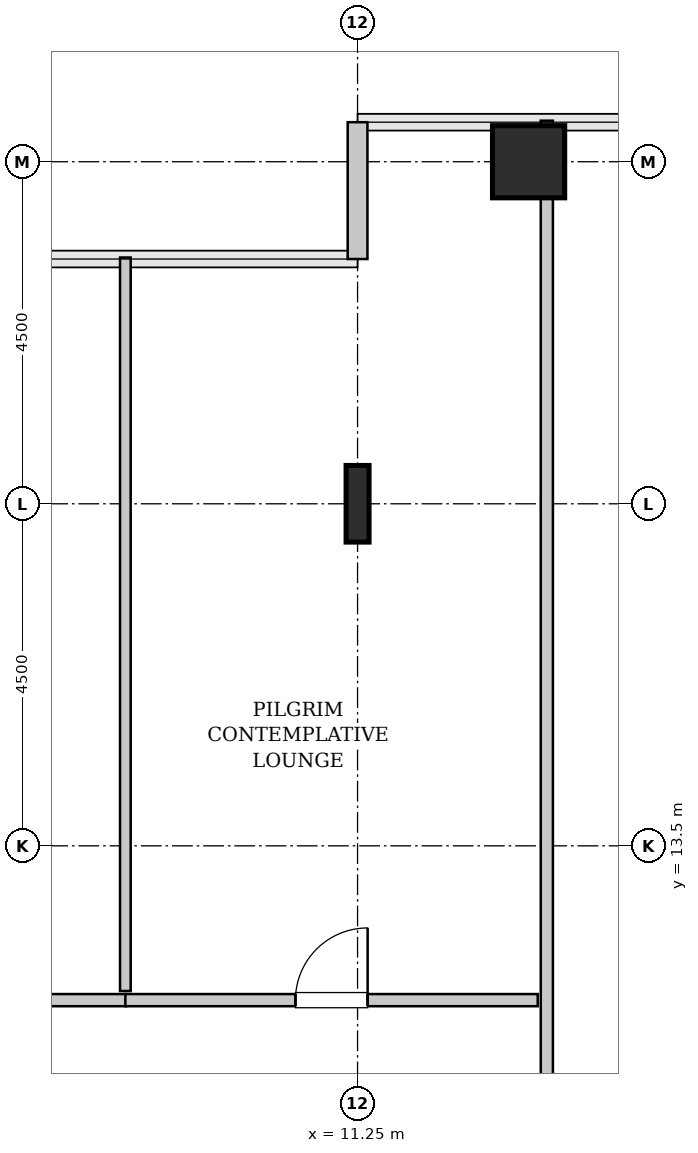
"""IFC4 building model, lengths in metres.
Left out: names, types, materials, properties, quantities, classifications, styles, units other than length and angle.
Written with IfcOpenShell. Run it as: python <this file> out.ifc"""

import sys

from ifc_helpers import new_model, si_unit, direction, frame, frame_2d, origin, origin_2d, place, context, subcontext, project, spatial, rectangle, hollow_rectangle, i_section, extrude, source, transform, mapped, element, fill, save


model = new_model("IFC4")
c1 = context("Model", 3, precision=1e-05, world=origin(), true_north=direction((0.0, 1.0)))
c2 = subcontext(c1, "Body", "Model", "MODEL_VIEW")
j1 = project(units=[si_unit("LENGTHUNIT", "METRE"), si_unit("PLANEANGLEUNIT", "RADIAN")], contexts=[c1])
p1 = place(None, origin())
s1 = spatial("IfcSite", under=j1, at=p1, CompositionType="ELEMENT")
p2 = place(p1, origin())
s2 = spatial("IfcBuilding", under=s1, at=p2, CompositionType="ELEMENT")
p3 = place(p2, frame((0.0, 0.0, 98.4)))
s3 = spatial("IfcBuildingStorey", under=s2, at=p3, CompositionType="ELEMENT", Elevation=98.4)
m1 = source(origin(), c2, "Body", "SweptSolid", [
    extrude(i_section(OverallWidth=0.302, OverallDepth=1.008, WebThickness=0.021, FlangeThickness=0.04, FilletRadius=0.03, at=origin_2d()), origin(), (0.0, 0.0, 1.0), 3.8),
])
p4 = place(p3, frame((11.25, 18.0, 0.0), z_axis=(0.0, 0.0, 1.0), x_axis=(1.0, 0.0, 0.0)))
e1 = element("IfcColumn", 1, at=p4, inside=s3, PredefinedType="COLUMN", context=c2, shape_type="MappedRepresentation", body=[
    mapped(m1, transform((0.0, 0.0, 0.0), x_axis=(1.0, 0.0, 0.0), y_axis=(0.0, 1.0, 0.0), z_axis=(0.0, 0.0, 1.0), scale=1.0)),
])
m2 = source(origin(), c2, "Body", "SweptSolid", [
    extrude(hollow_rectangle(XDim=0.95, YDim=0.95, WallThickness=0.045, InnerFilletRadius=0.045, OuterFilletRadius=0.09, at=origin_2d()), origin(), (0.0, 0.0, 1.0), 3.8),
])
p5 = place(p3, frame((13.5, 22.5, 0.0), z_axis=(0.0, 0.0, 1.0), x_axis=(1.0, 0.0, 0.0)))
e2 = element("IfcColumn", 2, at=p5, inside=s3, PredefinedType="COLUMN", context=c2, shape_type="MappedRepresentation", body=[
    mapped(m2, transform((0.0, 0.0, 0.0), x_axis=(1.0, 0.0, 0.0), y_axis=(0.0, 1.0, 0.0), z_axis=(0.0, 0.0, 1.0), scale=1.0)),
])
m3 = source(origin(), c2, "Body", "SweptSolid", [
    extrude(rectangle(XDim=1.8, YDim=0.26, at=frame_2d((0.9, 0.0))), origin(), (0.0, 0.0, 1.0), 3.55),
])
p6 = place(p3, frame((11.25, 23.02, 0.0), z_axis=(0.0, 0.0, 1.0), x_axis=(0.0, -1.0, 0.0)))
e3 = element("IfcWall", 3, at=p6, inside=s3, PredefinedType="SOLIDWALL", context=c2, shape_type="MappedRepresentation", body=[
    mapped(m3, transform((0.0, 0.0, 0.0), x_axis=(1.0, 0.0, 0.0), y_axis=(0.0, 1.0, 0.0), z_axis=(0.0, 0.0, 1.0), scale=1.0)),
])
m4 = source(origin(), c2, "Body", "SweptSolid", [
    extrude(rectangle(XDim=16.135, YDim=0.16, at=frame_2d((8.067, 0.0))), origin(), (0.0, 0.0, 1.0), 3.535),
])
p7 = place(p3, frame((13.74, 6.905, 0.0), z_axis=(0.0, 0.0, 1.0), x_axis=(0.0, 1.0, 0.0)))
e4 = element("IfcWall", 4, at=p7, inside=s3, PredefinedType="PARTITIONING", context=c2, shape_type="MappedRepresentation", body=[
    mapped(m4, transform((0.0, 0.0, 0.0), x_axis=(1.0, 0.0, 0.0), y_axis=(0.0, 1.0, 0.0), z_axis=(0.0, 0.0, 1.0), scale=1.0)),
])
p8 = place(p7, frame((1.827, 0.0, 0.0)))
e5 = element("IfcOpeningElement", 5, at=p8, cuts=e4, PredefinedType="OPENING", context=c2, shape_type="SweptSolid", body=[
    extrude(rectangle(XDim=0.95, YDim=2.1, at=frame_2d((0.475, 1.05))), frame((0.0, 0.09, 0.0), z_axis=(0.0, -1.0, 0.0), x_axis=(1.0, 0.0, 0.0)), (0.0, 0.0, 1.0), 0.18),
])
m5 = source(origin(), c2, "Body", "SweptSolid", [
    extrude(rectangle(XDim=5.61, YDim=0.16, at=frame_2d((2.805, 0.0))), origin(), (0.0, 0.0, 1.0), 3.535),
])
p9 = place(p3, frame((2.595, 11.47, 0.0), z_axis=(0.0, 0.0, 1.0), x_axis=(1.0, 0.0, 0.0)))
e6 = element("IfcWall", 6, at=p9, inside=s3, PredefinedType="PARTITIONING", context=c2, shape_type="MappedRepresentation", body=[
    mapped(m5, transform((0.0, 0.0, 0.0), x_axis=(1.0, 0.0, 0.0), y_axis=(0.0, 1.0, 0.0), z_axis=(0.0, 0.0, 1.0), scale=1.0)),
])
p10 = place(p9, frame((2.33, 0.0, 0.0)))
e7 = element("IfcOpeningElement", 7, at=p10, cuts=e6, PredefinedType="OPENING", context=c2, shape_type="SweptSolid", body=[
    extrude(rectangle(XDim=0.95, YDim=2.1, at=frame_2d((0.475, 1.05))), frame((0.0, 0.09, 0.0), z_axis=(0.0, -1.0, 0.0), x_axis=(1.0, 0.0, 0.0)), (0.0, 0.0, 1.0), 0.18),
])
m6 = source(origin(), c2, "Body", "SweptSolid", [
    extrude(rectangle(XDim=9.65, YDim=0.14, at=frame_2d((4.825, 0.0))), origin(), (0.0, 0.0, 1.0), 3.535),
])
p11 = place(p3, frame((8.195, 11.59, 0.0), z_axis=(0.0, 0.0, 1.0), x_axis=(0.0, 1.0, 0.0)))
e8 = element("IfcWall", 8, at=p11, inside=s3, PredefinedType="PARTITIONING", context=c2, shape_type="MappedRepresentation", body=[
    mapped(m6, transform((0.0, 0.0, 0.0), x_axis=(1.0, 0.0, 0.0), y_axis=(0.0, 1.0, 0.0), z_axis=(0.0, 0.0, 1.0), scale=1.0)),
])
m7 = source(origin(), c2, "Body", "SweptSolid", [
    extrude(rectangle(XDim=5.425, YDim=0.16, at=frame_2d((2.712, 0.0))), origin(), (0.0, 0.0, 1.0), 3.535),
])
p12 = place(p3, frame((8.195, 11.47, 0.0), z_axis=(0.0, 0.0, 1.0), x_axis=(1.0, 0.0, 0.0)))
e9 = element("IfcWall", 9, at=p12, inside=s3, PredefinedType="PARTITIONING", context=c2, shape_type="MappedRepresentation", body=[
    mapped(m7, transform((0.0, 0.0, 0.0), x_axis=(1.0, 0.0, 0.0), y_axis=(0.0, 1.0, 0.0), z_axis=(0.0, 0.0, 1.0), scale=1.0)),
])
p13 = place(p12, frame((2.238, 0.0, 0.0)))
e10 = element("IfcOpeningElement", 10, at=p13, cuts=e9, PredefinedType="OPENING", context=c2, shape_type="SweptSolid", body=[
    extrude(rectangle(XDim=0.95, YDim=2.1, at=frame_2d((0.475, 1.05))), frame((0.0, 0.09, 0.0), z_axis=(0.0, -1.0, 0.0), x_axis=(1.0, 0.0, 0.0)), (0.0, 0.0, 1.0), 0.18),
])
m8 = source(origin(), c2, "Body", "SweptSolid", [
    extrude(rectangle(XDim=0.95, YDim=2.1, at=frame_2d((0.475, 1.05))), frame((0.0, 0.025, 0.0), z_axis=(0.0, -1.0, 0.0), x_axis=(1.0, 0.0, 0.0)), (0.0, 0.0, 1.0), 0.05),
])
p14 = place(p13, origin())
e11 = element("IfcDoor", 11, at=p14, inside=s3, OperationType="SINGLE_SWING_RIGHT", PredefinedType="DOOR", context=c2, shape_type="MappedRepresentation", body=[
    mapped(m8, transform((0.0, 0.0, 0.0), x_axis=(1.0, 0.0, 0.0), y_axis=(0.0, 1.0, 0.0), z_axis=(0.0, 0.0, 1.0), scale=1.0)),
])
fill(e10, e11)
save(model, sys.argv[1])
